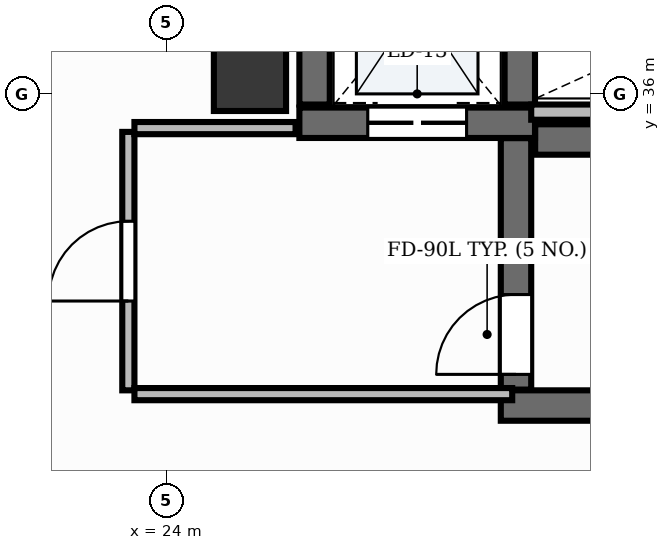
"""IFC4 building model, lengths in metres.
Left out: names, types, materials, properties, quantities, classifications, styles, units other than length and angle.
Written with IfcOpenShell. Run it as: python <this file> out.ifc"""

import sys

from ifc_helpers import new_model, si_unit, direction, frame, frame_2d, origin, origin_2d, place, context, subcontext, project, spatial, rectangle, extrude, element, fill, save


model = new_model("IFC4")
c1 = context("Model", 3, precision=1e-05, world=origin(), true_north=direction((0.0, 1.0)))
c2 = subcontext(c1, "Body", "Model", "MODEL_VIEW")
j1 = project(units=[si_unit("LENGTHUNIT", "METRE"), si_unit("PLANEANGLEUNIT", "RADIAN")], contexts=[c1])
p1 = place(None, origin())
s1 = spatial("IfcSite", under=j1, at=p1, CompositionType="ELEMENT")
p2 = place(p1, origin())
s2 = spatial("IfcBuilding", under=s1, at=p2, CompositionType="ELEMENT")
p3 = place(p2, frame((0.0, 0.0, 200.4)))
s3 = spatial("IfcBuildingStorey", under=s2, at=p3, CompositionType="ELEMENT", Elevation=200.4)
p4 = place(p3, frame((28.852, 35.4, 0.0), z_axis=(0.0, 0.0, 1.0), x_axis=(1.0, 0.0, 0.0)))
e1 = element("IfcWall", 1, at=p4, inside=s3, PredefinedType="SHEAR", context=c2, shape_type="SweptSolid", body=[
    extrude(rectangle(XDim=8.198, YDim=0.4, at=frame_2d((4.099, 0.0))), origin(), (0.0, 0.0, 1.0), 3.9),
])
p5 = place(p3, frame((28.4, 31.9, 0.0), z_axis=(0.0, 0.0, 1.0), x_axis=(1.0, 0.0, 0.0)))
e2 = element("IfcWall", 2, at=p5, inside=s3, PredefinedType="SHEAR", context=c2, shape_type="SweptSolid", body=[
    extrude(rectangle(XDim=8.65, YDim=0.4, at=frame_2d((4.325, 0.0))), origin(), (0.0, 0.0, 1.0), 3.9),
])
p6 = place(p3, frame((28.6, 32.11, 0.0), z_axis=(0.0, 0.0, 1.0), x_axis=(0.0, 1.0, 0.0)))
e3 = element("IfcWall", 3, at=p6, inside=s3, PredefinedType="SHEAR", context=c2, shape_type="SweptSolid", body=[
    extrude(rectangle(XDim=3.308, YDim=0.4, at=frame_2d((1.654, 0.0))), origin(), (0.0, 0.0, 1.0), 3.9),
])
p7 = place(p6, frame((0.2, 0.0, 0.0)))
e4 = element("IfcOpeningElement", 4, at=p7, cuts=e3, PredefinedType="OPENING", context=c2, shape_type="SweptSolid", body=[
    extrude(rectangle(XDim=1.05, YDim=2.15, at=frame_2d((0.525, 1.075))), frame((0.0, 0.215, 0.0), z_axis=(0.0, -1.0, 0.0), x_axis=(1.0, 0.0, 0.0)), (0.0, 0.0, 1.0), 0.43),
])
p8 = place(p3, frame((25.75, 35.62, 0.0), z_axis=(0.0, 0.0, 1.0), x_axis=(1.0, 0.0, 0.0)))
e5 = element("IfcWall", 5, at=p8, inside=s3, PredefinedType="SHEAR", context=c2, shape_type="SweptSolid", body=[
    extrude(rectangle(XDim=3.1, YDim=0.4, at=frame_2d((1.55, 0.0))), origin(), (0.0, 0.0, 1.0), 3.9),
])
p9 = place(p8, frame((0.9, 0.0, 0.0)))
e6 = element("IfcOpeningElement", 6, at=p9, cuts=e5, PredefinedType="OPENING", context=c2, shape_type="SweptSolid", body=[
    extrude(rectangle(XDim=1.3, YDim=2.2, at=frame_2d((0.65, 1.1))), frame((0.0, 0.215, 0.0), z_axis=(0.0, -1.0, 0.0), x_axis=(1.0, 0.0, 0.0)), (0.0, 0.0, 1.0), 0.43),
])
for number, where, z_axis, x_axis in (
    (7, (25.95, 35.86, 0.0), (0.0, 0.0, 1.0), (0.0, 1.0, 0.0)),
    (8, (28.65, 35.86, 0.0), (0.0, 0.0, 1.0), (0.0, 1.0, 0.0)),
):
    element("IfcWall", number, at=place(p3, frame(where, z_axis=z_axis, x_axis=x_axis)), inside=s3, PredefinedType="SHEAR", context=c2, shape_type="SweptSolid", body=[
        extrude(rectangle(XDim=2.7, YDim=0.4, at=frame_2d((1.35, 0.0))), origin(), (0.0, 0.0, 1.0), 3.9),
    ])
p10 = place(p3, frame((25.1, 36.25, -0.0), z_axis=(0.0, 0.0, 1.0), x_axis=(1.0, 0.0, 0.0)))
e9 = element("IfcColumn", 9, at=p10, inside=s3, PredefinedType="PILASTER", context=c2, shape_type="SweptSolid", body=[
    extrude(rectangle(XDim=0.95, YDim=0.95, at=origin_2d()), origin(), (0.0, 0.0, 1.0), 3.901),
])
p11 = place(p3, frame((28.8, 35.76, 0.0), z_axis=(0.0, 0.0, 1.0), x_axis=(1.0, 0.0, 0.0)))
e10 = element("IfcWall", 10, at=p11, inside=s3, PredefinedType="PARTITIONING", context=c2, shape_type="SweptSolid", body=[
    extrude(rectangle(XDim=4.57, YDim=0.2, at=frame_2d((2.285, 0.0))), origin(), (0.0, 0.0, 1.0), 2.91),
])
p12 = place(p3, frame((23.5, 32.1, 0.0), z_axis=(0.0, 0.0, 1.0), x_axis=(0.0, 1.0, 0.0)))
e11 = element("IfcWall", 11, at=p12, inside=s3, PredefinedType="PARTITIONING", context=c2, shape_type="SweptSolid", body=[
    extrude(rectangle(XDim=3.4, YDim=0.16, at=frame_2d((1.7, 0.0))), origin(), (0.0, 0.0, 1.0), 2.91),
])
p13 = place(p12, frame((1.175, 0.0, 0.0)))
e12 = element("IfcOpeningElement", 12, at=p13, cuts=e11, PredefinedType="OPENING", context=c2, shape_type="SweptSolid", body=[
    extrude(rectangle(XDim=1.05, YDim=2.15, at=frame_2d((0.525, 1.075))), frame((0.0, 0.095, 0.0), z_axis=(0.0, -1.0, 0.0), x_axis=(1.0, 0.0, 0.0)), (0.0, 0.0, 1.0), 0.19),
])
p14 = place(p3, frame((23.58, 32.05, 0.0), z_axis=(0.0, 0.0, 1.0), x_axis=(1.0, 0.0, 0.0)))
e13 = element("IfcWall", 13, at=p14, inside=s3, PredefinedType="PARTITIONING", context=c2, shape_type="SweptSolid", body=[
    extrude(rectangle(XDim=4.97, YDim=0.16, at=frame_2d((2.485, 0.0))), origin(), (0.0, 0.0, 1.0), 2.91),
])
p15 = place(p3, frame((23.58, 35.55, 0.0), z_axis=(0.0, 0.0, 1.0), x_axis=(1.0, 0.0, 0.0)))
e14 = element("IfcWall", 14, at=p15, inside=s3, PredefinedType="PARTITIONING", context=c2, shape_type="SweptSolid", body=[
    extrude(rectangle(XDim=2.12, YDim=0.16, at=frame_2d((1.06, 0.0))), origin(), (0.0, 0.0, 1.0), 2.91),
])
p16 = place(p7, origin())
e15 = element("IfcDoor", 15, at=p16, inside=s3, OperationType="SINGLE_SWING_LEFT", PredefinedType="DOOR", context=c2, shape_type="SweptSolid", body=[
    extrude(rectangle(XDim=1.05, YDim=2.15, at=frame_2d((0.525, 1.075))), frame((0.0, 0.025, 0.0), z_axis=(0.0, -1.0, 0.0), x_axis=(1.0, 0.0, 0.0)), (0.0, 0.0, 1.0), 0.05),
])
fill(e4, e15)
p17 = place(p9, origin())
e16 = element("IfcDoor", 16, at=p17, inside=s3, OperationType="DOUBLE_DOOR_SLIDING", PredefinedType="DOOR", context=c2, shape_type="SweptSolid", body=[
    extrude(rectangle(XDim=1.3, YDim=2.2, at=frame_2d((0.65, 1.1))), frame((0.0, 0.025, 0.0), z_axis=(0.0, -1.0, 0.0), x_axis=(1.0, 0.0, 0.0)), (0.0, 0.0, 1.0), 0.05),
])
fill(e6, e16)
p18 = place(p13, origin())
e17 = element("IfcDoor", 17, at=p18, inside=s3, OperationType="SINGLE_SWING_LEFT", PredefinedType="DOOR", context=c2, shape_type="SweptSolid", body=[
    extrude(rectangle(XDim=1.05, YDim=2.15, at=frame_2d((0.525, 1.075))), frame((0.0, 0.025, 0.0), z_axis=(0.0, -1.0, 0.0), x_axis=(1.0, 0.0, 0.0)), (0.0, 0.0, 1.0), 0.05),
])
fill(e12, e17)
save(model, sys.argv[1])
